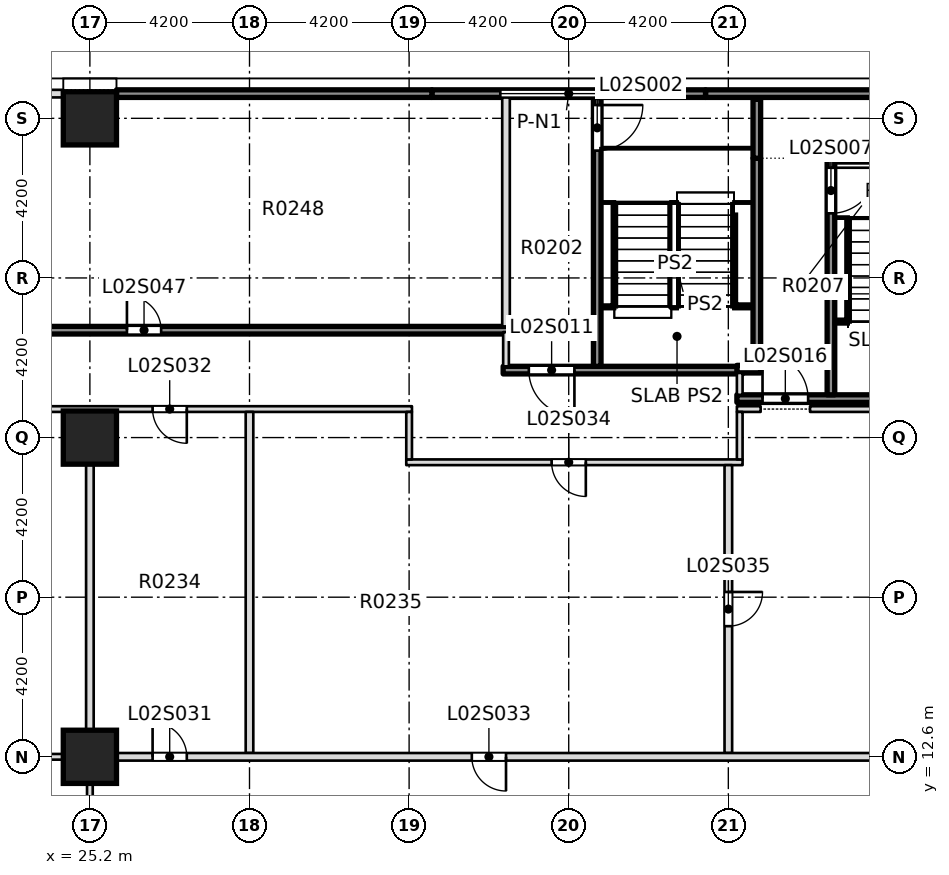
"""IFC4 building model, lengths in metres.
Left out: names, types, materials, properties, quantities, classifications, styles, units other than length and angle.
Written with IfcOpenShell. Run it as: python <this file> out.ifc"""

import sys

from ifc_helpers import new_model, si_unit, direction, frame, frame_2d, origin, origin_2d, place, context, subcontext, project, spatial, rectangle, extrude, element, fill, save


model = new_model("IFC4")
c1 = context("Model", 3, precision=1e-05, world=origin(), true_north=direction((0.0, 1.0)))
c2 = subcontext(c1, "Body", "Model", "MODEL_VIEW")
j1 = project(units=[si_unit("LENGTHUNIT", "METRE"), si_unit("PLANEANGLEUNIT", "RADIAN")], contexts=[c1])
p1 = place(None, origin())
s1 = spatial("IfcSite", under=j1, at=p1, CompositionType="ELEMENT")
p2 = place(p1, origin())
s2 = spatial("IfcBuilding", under=s1, at=p2, CompositionType="ELEMENT")
p3 = place(p2, frame((0.0, 0.0, 12.5)))
s3 = spatial("IfcBuildingStorey", under=s2, at=p3, CompositionType="ELEMENT", Elevation=12.5)
for number, where, z_axis, x_axis in (
    (1, (25.2, 12.6, -0.4), (0.0, 0.0, 1.0), (1.0, 0.0, 0.0)),
    (2, (25.2, 21.0, 0.0), (0.0, 0.0, 1.0), (1.0, 0.0, 0.0)),
    (3, (25.2, 29.4, 0.0), (0.0, 0.0, 1.0), (1.0, 0.0, 0.0)),
):
    element("IfcColumn", number, at=place(p3, frame(where, z_axis=z_axis, x_axis=x_axis)), inside=s3, PredefinedType="COLUMN", context=c2, shape_type="SweptSolid", body=[
        extrude(rectangle(XDim=1.4, YDim=1.4, at=origin_2d()), origin(), (0.0, 0.0, 1.0), 7.5),
    ])
p4 = place(p3, frame((16.725, 12.6, 0.0), z_axis=(0.0, 0.0, 1.0), x_axis=(1.0, 0.0, 0.0)))
e4 = element("IfcWall", 4, at=p4, inside=s3, PredefinedType="PARTITIONING", context=c2, shape_type="SweptSolid", body=[
    extrude(rectangle(XDim=8.575, YDim=0.15, at=frame_2d((4.288, 0.0))), origin(), (0.0, 0.0, 1.0), 7.1),
])
p5 = place(p3, frame((25.1, 12.6, 0.0), z_axis=(0.0, 0.0, 1.0), x_axis=(1.0, 0.0, 0.0)))
e5 = element("IfcWall", 5, at=p5, inside=s3, PredefinedType="PARTITIONING", context=c2, shape_type="SweptSolid", body=[
    extrude(rectangle(XDim=0.8, YDim=0.2, at=frame_2d((0.4, 0.0))), origin(), (0.0, 0.0, 1.0), 7.1),
])
p6 = place(p3, frame((33.525, 20.35, 0.0), z_axis=(0.0, 0.0, 1.0), x_axis=(1.0, 0.0, 0.0)))
e6 = element("IfcWall", 6, at=p6, inside=s3, PredefinedType="PARTITIONING", context=c2, shape_type="SweptSolid", body=[
    extrude(rectangle(XDim=8.85, YDim=0.15, at=frame_2d((4.425, 0.0))), origin(), (0.0, 0.0, 1.0), 7.1),
])
p7 = place(p6, frame((3.825, 0.0, 0.0)))
e7 = element("IfcOpeningElement", 7, at=p7, cuts=e6, PredefinedType="OPENING", context=c2, shape_type="SweptSolid", body=[
    extrude(rectangle(XDim=0.9, YDim=2.1, at=frame_2d((0.45, 1.05))), frame((0.0, 0.085, 0.0), z_axis=(0.0, -1.0, 0.0), x_axis=(1.0, 0.0, 0.0)), (0.0, 0.0, 1.0), 0.17),
])
p8 = place(p3, frame((12.601, 21.75, 0.0), z_axis=(0.0, 0.0, 1.0), x_axis=(1.0, 0.0, 0.0)))
e8 = element("IfcWall", 8, at=p8, inside=s3, PredefinedType="PARTITIONING", context=c2, shape_type="SweptSolid", body=[
    extrude(rectangle(XDim=21.074, YDim=0.15, at=frame_2d((10.537, 0.0))), origin(), (0.0, 0.0, 1.0), 7.1),
])
p9 = place(p8, frame((14.249, 0.0, 0.0)))
e9 = element("IfcOpeningElement", 9, at=p9, cuts=e8, PredefinedType="OPENING", context=c2, shape_type="SweptSolid", body=[
    extrude(rectangle(XDim=0.9, YDim=2.1, at=frame_2d((0.45, 1.05))), frame((0.0, 0.085, 0.0), z_axis=(0.0, -1.0, 0.0), x_axis=(1.0, 0.0, 0.0)), (0.0, 0.0, 1.0), 0.17),
])
p10 = place(p3, frame((42.225, 21.75, 0.0), z_axis=(0.0, 0.0, 1.0), x_axis=(1.0, 0.0, 0.0)))
e10 = element("IfcWall", 10, at=p10, inside=s3, PredefinedType="PARTITIONING", context=c2, shape_type="SweptSolid", body=[
    extrude(rectangle(XDim=0.625, YDim=0.15, at=frame_2d((0.312, 0.0))), origin(), (0.0, 0.0, 1.0), 7.1),
])
p11 = place(p3, frame((42.225, 22.025, 0.0), z_axis=(0.0, 0.0, 1.0), x_axis=(1.0, 0.0, 0.0)))
e11 = element("IfcWall", 11, at=p11, inside=s3, PredefinedType="SOLIDWALL", context=c2, shape_type="SweptSolid", body=[
    extrude(rectangle(XDim=6.75, YDim=0.2, at=frame_2d((3.375, 0.0))), origin(), (0.0, 0.0, 1.0), 7.1),
])
p12 = place(p11, frame((0.675, 0.0, 0.0)))
e12 = element("IfcOpeningElement", 12, at=p12, cuts=e11, PredefinedType="OPENING", context=c2, shape_type="SweptSolid", body=[
    extrude(rectangle(XDim=1.2, YDim=2.1, at=frame_2d((0.6, 1.05))), frame((0.0, 0.11, 0.0), z_axis=(0.0, -1.0, 0.0), x_axis=(1.0, 0.0, 0.0)), (0.0, 0.0, 1.0), 0.22),
])
p13 = place(p3, frame((36.075, 22.775, 0.0), z_axis=(0.0, 0.0, 1.0), x_axis=(1.0, 0.0, 0.0)))
e13 = element("IfcWall", 13, at=p13, inside=s3, PredefinedType="SOLIDWALL", context=c2, shape_type="SweptSolid", body=[
    extrude(rectangle(XDim=6.3, YDim=0.2, at=frame_2d((3.15, 0.0))), origin(), (0.0, 0.0, 1.0), 7.1),
])
p14 = place(p13, frame((0.675, 0.0, 0.0)))
e14 = element("IfcOpeningElement", 14, at=p14, cuts=e13, PredefinedType="OPENING", context=c2, shape_type="SweptSolid", body=[
    extrude(rectangle(XDim=1.2, YDim=2.1, at=frame_2d((0.6, 1.05))), frame((0.0, 0.11, 0.0), z_axis=(0.0, -1.0, 0.0), x_axis=(1.0, 0.0, 0.0)), (0.0, 0.0, 1.0), 0.22),
])
p15 = place(p3, frame((42.225, 22.8, 0.0), z_axis=(0.0, 0.0, 1.0), x_axis=(1.0, 0.0, 0.0)))
e15 = element("IfcWall", 15, at=p15, inside=s3, PredefinedType="SOLIDWALL", context=c2, shape_type="SweptSolid", body=[
    extrude(rectangle(XDim=0.625, YDim=0.2, at=frame_2d((0.312, 0.0))), origin(), (0.0, 0.0, 1.0), 7.1),
])
p16 = place(p3, frame((-15.2, 23.825, 0.0), z_axis=(0.0, 0.0, 1.0), x_axis=(1.0, 0.0, 0.0)))
e16 = element("IfcWall", 16, at=p16, inside=s3, PredefinedType="SOLIDWALL", context=c2, shape_type="SweptSolid", body=[
    extrude(rectangle(XDim=51.45, YDim=0.2, at=frame_2d((25.725, 0.0))), origin(), (0.0, 0.0, 1.0), 7.1),
])
p17 = place(p16, frame((17.9, 0.0, 0.0)))
e17 = element("IfcOpeningElement", 17, at=p17, cuts=e16, PredefinedType="OPENING", context=c2, shape_type="SweptSolid", body=[
    extrude(rectangle(XDim=1.2, YDim=2.1, at=frame_2d((0.6, 1.05))), frame((0.0, 0.11, 0.0), z_axis=(0.0, -1.0, 0.0), x_axis=(1.0, 0.0, 0.0)), (0.0, 0.0, 1.0), 0.22),
])
p18 = place(p16, frame((1.7, 0.0, 0.0)))
e18 = element("IfcOpeningElement", 18, at=p18, cuts=e16, PredefinedType="OPENING", context=c2, shape_type="SweptSolid", body=[
    extrude(rectangle(XDim=0.9, YDim=2.1, at=frame_2d((0.45, 1.05))), frame((0.0, 0.11, 0.0), z_axis=(0.0, -1.0, 0.0), x_axis=(1.0, 0.0, 0.0)), (0.0, 0.0, 1.0), 0.22),
])
p19 = place(p16, frame((8.225, 0.0, 0.0)))
e19 = element("IfcOpeningElement", 19, at=p19, cuts=e16, PredefinedType="OPENING", context=c2, shape_type="SweptSolid", body=[
    extrude(rectangle(XDim=0.9, YDim=2.1, at=frame_2d((0.45, 1.05))), frame((0.0, 0.11, 0.0), z_axis=(0.0, -1.0, 0.0), x_axis=(1.0, 0.0, 0.0)), (0.0, 0.0, 1.0), 0.22),
])
p20 = place(p16, frame((25.4, 0.0, 0.0)))
e20 = element("IfcOpeningElement", 20, at=p20, cuts=e16, PredefinedType="OPENING", context=c2, shape_type="SweptSolid", body=[
    extrude(rectangle(XDim=1.2, YDim=2.1, at=frame_2d((0.6, 1.05))), frame((0.0, 0.11, 0.0), z_axis=(0.0, -1.0, 0.0), x_axis=(1.0, 0.0, 0.0)), (0.0, 0.0, 1.0), 0.22),
])
p21 = place(p16, frame((41.375, 0.0, 0.0)))
e21 = element("IfcOpeningElement", 21, at=p21, cuts=e16, PredefinedType="OPENING", context=c2, shape_type="SweptSolid", body=[
    extrude(rectangle(XDim=0.9, YDim=2.1, at=frame_2d((0.45, 1.05))), frame((0.0, 0.11, 0.0), z_axis=(0.0, -1.0, 0.0), x_axis=(1.0, 0.0, 0.0)), (0.0, 0.0, 1.0), 0.22),
])
p22 = place(p3, frame((25.2, -11.825, 0.0), z_axis=(0.0, 0.0, 1.0), x_axis=(0.0, 1.0, 0.0)))
e22 = element("IfcWall", 22, at=p22, inside=s3, PredefinedType="PARTITIONING", context=c2, shape_type="SweptSolid", body=[
    extrude(rectangle(XDim=24.325, YDim=0.15, at=frame_2d((12.163, 0.0))), origin(), (0.0, 0.0, 1.0), 7.1),
])
p23 = place(p22, frame((10.962, 0.0, 0.0)))
e23 = element("IfcOpeningElement", 23, at=p23, cuts=e22, PredefinedType="OPENING", context=c2, shape_type="SweptSolid", body=[
    extrude(rectangle(XDim=2.4, YDim=2.1, at=frame_2d((1.2, 1.05))), frame((0.0, 0.085, 0.0), z_axis=(0.0, -1.0, 0.0), x_axis=(1.0, 0.0, 0.0)), (0.0, 0.0, 1.0), 0.17),
])
for number, where, z_axis, x_axis in (
    (24, (25.2, 12.7, 0.0), (0.0, 0.0, 1.0), (0.0, 1.0, 0.0)),
    (25, (29.4, 12.7, 0.0), (0.0, 0.0, 1.0), (0.0, 1.0, 0.0)),
):
    element("IfcWall", number, at=place(p3, frame(where, z_axis=z_axis, x_axis=x_axis)), inside=s3, PredefinedType="PARTITIONING", context=c2, shape_type="SweptSolid", body=[
        extrude(rectangle(XDim=8.975, YDim=0.2, at=frame_2d((4.488, 0.0))), origin(), (0.0, 0.0, 1.0), 7.1),
    ])
p24 = place(p3, frame((33.6, 20.425, 0.0), z_axis=(0.0, 0.0, 1.0), x_axis=(0.0, 1.0, 0.0)))
e26 = element("IfcWall", 26, at=p24, inside=s3, PredefinedType="PARTITIONING", context=c2, shape_type="SweptSolid", body=[
    extrude(rectangle(XDim=1.25, YDim=0.15, at=frame_2d((0.625, 0.0))), origin(), (0.0, 0.0, 1.0), 7.1),
])
p25 = place(p3, frame((36.15, 22.875, 0.0), z_axis=(0.0, 0.0, 1.0), x_axis=(0.0, 1.0, 0.0)))
e27 = element("IfcWall", 27, at=p25, inside=s3, PredefinedType="PARTITIONING", context=c2, shape_type="SweptSolid", body=[
    extrude(rectangle(XDim=0.9, YDim=0.15, at=frame_2d((0.45, 0.0))), origin(), (0.0, 0.0, 1.0), 7.1),
])
p26 = place(p3, frame((36.15, 23.925, 0.0), z_axis=(0.0, 0.0, 1.0), x_axis=(0.0, 1.0, 0.0)))
e28 = element("IfcWall", 28, at=p26, inside=s3, PredefinedType="PARTITIONING", context=c2, shape_type="SweptSolid", body=[
    extrude(rectangle(XDim=6.025, YDim=0.2, at=frame_2d((3.012, 0.0))), origin(), (0.0, 0.0, 1.0), 7.1),
])
p27 = place(p3, frame((38.55, 22.875, 0.0), z_axis=(0.0, 0.0, 1.0), x_axis=(0.0, 1.0, 0.0)))
e29 = element("IfcWall", 29, at=p27, inside=s3, PredefinedType="SOLIDWALL", context=c2, shape_type="SweptSolid", body=[
    extrude(rectangle(XDim=7.075, YDim=0.2, at=frame_2d((3.538, 0.0))), origin(), (0.0, 0.0, 1.0), 7.1),
])
p28 = place(p27, frame((5.675, 0.0, 0.0)))
e30 = element("IfcOpeningElement", 30, at=p28, cuts=e29, PredefinedType="OPENING", context=c2, shape_type="SweptSolid", body=[
    extrude(rectangle(XDim=1.2, YDim=2.1, at=frame_2d((0.6, 1.05))), frame((0.0, 0.11, 0.0), z_axis=(0.0, -1.0, 0.0), x_axis=(1.0, 0.0, 0.0)), (0.0, 0.0, 1.0), 0.22),
])
p29 = place(p3, frame((42.0, 12.7, 0.0), z_axis=(0.0, 0.0, 1.0), x_axis=(0.0, 1.0, 0.0)))
e31 = element("IfcWall", 31, at=p29, inside=s3, PredefinedType="PARTITIONING", context=c2, shape_type="SweptSolid", body=[
    extrude(rectangle(XDim=7.575, YDim=0.2, at=frame_2d((3.788, 0.0))), origin(), (0.0, 0.0, 1.0), 7.1),
])
p30 = place(p29, frame((3.337, 0.0, 0.0)))
e32 = element("IfcOpeningElement", 32, at=p30, cuts=e31, PredefinedType="OPENING", context=c2, shape_type="SweptSolid", body=[
    extrude(rectangle(XDim=0.9, YDim=2.1, at=frame_2d((0.45, 1.05))), frame((0.0, 0.11, 0.0), z_axis=(0.0, -1.0, 0.0), x_axis=(1.0, 0.0, 0.0)), (0.0, 0.0, 1.0), 0.22),
])
p31 = place(p3, frame((42.3, 20.425, 0.0), z_axis=(0.0, 0.0, 1.0), x_axis=(0.0, 1.0, 0.0)))
e33 = element("IfcWall", 33, at=p31, inside=s3, PredefinedType="PARTITIONING", context=c2, shape_type="SweptSolid", body=[
    extrude(rectangle(XDim=1.25, YDim=0.15, at=frame_2d((0.625, 0.0))), origin(), (0.0, 0.0, 1.0), 7.1),
])
p32 = place(p3, frame((42.3, 22.125, 0.0), z_axis=(0.0, 0.0, 1.0), x_axis=(0.0, 1.0, 0.0)))
e34 = element("IfcWall", 34, at=p32, inside=s3, PredefinedType="PARTITIONING", context=c2, shape_type="SweptSolid", body=[
    extrude(rectangle(XDim=0.575, YDim=0.15, at=frame_2d((0.288, 0.0))), origin(), (0.0, 0.0, 1.0), 7.1),
])
p33 = place(p3, frame((42.75, 22.9, 0.0), z_axis=(0.0, 0.0, 1.0), x_axis=(0.0, 1.0, 0.0)))
e35 = element("IfcWall", 35, at=p33, inside=s3, PredefinedType="SOLIDWALL", context=c2, shape_type="SweptSolid", body=[
    extrude(rectangle(XDim=5.45, YDim=0.2, at=frame_2d((2.725, 0.0))), origin(), (0.0, 0.0, 1.0), 7.1),
])
p34 = place(p3, frame((44.7, 22.125, 0.0), z_axis=(0.0, 0.0, 1.0), x_axis=(0.0, 1.0, 0.0)))
e36 = element("IfcWall", 36, at=p34, inside=s3, PredefinedType="SOLIDWALL", context=c2, shape_type="SweptSolid", body=[
    extrude(rectangle(XDim=6.225, YDim=0.2, at=frame_2d((3.113, 0.0))), origin(), (0.0, 0.0, 1.0), 7.1),
])
p35 = place(p34, frame((4.775, 0.0, 0.0)))
e37 = element("IfcOpeningElement", 37, at=p35, cuts=e36, PredefinedType="OPENING", context=c2, shape_type="SweptSolid", body=[
    extrude(rectangle(XDim=1.2, YDim=2.1, at=frame_2d((0.6, 1.05))), frame((0.0, 0.11, 0.0), z_axis=(0.0, -1.0, 0.0), x_axis=(1.0, 0.0, 0.0)), (0.0, 0.0, 1.0), 0.22),
])
p36 = place(p3, frame((41.4, 30.05, 0.0), z_axis=(0.0, 0.0, 1.0), x_axis=(1.0, 0.0, 0.0)))
e38 = element("IfcWall", 38, at=p36, inside=s3, PredefinedType="SOLIDWALL", context=c2, shape_type="SweptSolid", body=[
    extrude(rectangle(XDim=8.3, YDim=0.2, at=frame_2d((4.15, 0.0))), origin(), (0.0, 0.0, 1.0), 7.1),
])
p37 = place(p3, frame((24.5, 30.05, 0.0), z_axis=(0.0, 0.0, 1.0), x_axis=(-1.0, 0.0, 0.0)))
e39 = element("IfcWall", 39, at=p37, inside=s3, PredefinedType="STANDARD", context=c2, shape_type="SweptSolid", body=[
    extrude(rectangle(XDim=7.0, YDim=0.2, at=frame_2d((3.5, 0.0))), origin(), (0.0, 0.0, 1.0), 7.1),
])
p38 = place(p37, frame((1.7, 0.0, 0.9)))
e40 = element("IfcOpeningElement", 40, at=p38, cuts=e39, PredefinedType="OPENING", context=c2, shape_type="SweptSolid", body=[
    extrude(rectangle(XDim=3.6, YDim=4.2, at=frame_2d((1.8, 2.1))), frame((0.0, 0.11, 0.0), z_axis=(0.0, -1.0, 0.0), x_axis=(1.0, 0.0, 0.0)), (0.0, 0.0, 1.0), 0.22),
])
p39 = place(p3, frame((42.75, 28.35, 0.0), z_axis=(0.0, 0.0, 1.0), x_axis=(0.0, 1.0, 0.0)))
e41 = element("IfcWall", 41, at=p39, inside=s3, PredefinedType="SOLIDWALL", context=c2, shape_type="SweptSolid", body=[
    extrude(rectangle(XDim=1.55, YDim=0.2, at=frame_2d((0.775, 0.0))), origin(), (0.0, 0.0, 1.0), 7.1),
])
p40 = place(p3, frame((44.85, 28.35, 0.0), z_axis=(0.0, 0.0, 1.0), x_axis=(1.0, 0.0, 0.0)))
e42 = element("IfcWall", 42, at=p40, inside=s3, PredefinedType="SOLIDWALL", context=c2, shape_type="SweptSolid", body=[
    extrude(rectangle(XDim=3.9, YDim=0.2, at=frame_2d((1.95, 0.0))), origin(), (0.0, 0.0, 1.0), 7.1),
])
p41 = place(p3, frame((34.2, 30.05, 0.0), z_axis=(0.0, 0.0, 1.0), x_axis=(1.0, 0.0, 0.0)))
e43 = element("IfcWall", 43, at=p41, inside=s3, PredefinedType="SOLIDWALL", context=c2, shape_type="SweptSolid", body=[
    extrude(rectangle(XDim=7.2, YDim=0.2, at=frame_2d((3.6, 0.0))), origin(), (0.0, 0.0, 1.0), 7.1),
])
p42 = place(p41, frame((1.8, 0.0, 0.9)))
e44 = element("IfcOpeningElement", 44, at=p42, cuts=e43, PredefinedType="OPENING", context=c2, shape_type="SweptSolid", body=[
    extrude(rectangle(XDim=3.6, YDim=4.2, at=frame_2d((1.8, 2.1))), frame((0.0, 0.11, 0.0), z_axis=(0.0, -1.0, 0.0), x_axis=(1.0, 0.0, 0.0)), (0.0, 0.0, 1.0), 0.22),
])
p43 = place(p3, frame((25.9, 30.05, 0.0), z_axis=(0.0, 0.0, 1.0), x_axis=(1.0, 0.0, 0.0)))
e45 = element("IfcWall", 45, at=p43, inside=s3, PredefinedType="SOLIDWALL", context=c2, shape_type="SweptSolid", body=[
    extrude(rectangle(XDim=8.3, YDim=0.2, at=frame_2d((4.15, 0.0))), origin(), (0.0, 0.0, 1.0), 7.1),
])
p44 = place(p3, frame((25.9, 12.6, 0.0), z_axis=(0.0, 0.0, 1.0), x_axis=(1.0, 0.0, 0.0)))
e46 = element("IfcWall", 46, at=p44, inside=s3, PredefinedType="PARTITIONING", context=c2, shape_type="SweptSolid", body=[
    extrude(rectangle(XDim=23.8, YDim=0.2, at=frame_2d((11.9, 0.0))), origin(), (0.0, 0.0, 1.0), 4.4),
])
p45 = place(p44, frame((0.95, 0.0, 0.0)))
e47 = element("IfcOpeningElement", 47, at=p45, cuts=e46, PredefinedType="OPENING", context=c2, shape_type="SweptSolid", body=[
    extrude(rectangle(XDim=0.9, YDim=2.1, at=frame_2d((0.45, 1.05))), frame((0.0, 0.11, 0.0), z_axis=(0.0, -1.0, 0.0), x_axis=(1.0, 0.0, 0.0)), (0.0, 0.0, 1.0), 0.22),
])
p46 = place(p44, frame((9.35, 0.0, 0.0)))
e48 = element("IfcOpeningElement", 48, at=p46, cuts=e46, PredefinedType="OPENING", context=c2, shape_type="SweptSolid", body=[
    extrude(rectangle(XDim=0.9, YDim=2.1, at=frame_2d((0.45, 1.05))), frame((0.0, 0.11, 0.0), z_axis=(0.0, -1.0, 0.0), x_axis=(1.0, 0.0, 0.0)), (0.0, 0.0, 1.0), 0.22),
])
p47 = place(p3, frame((44.15, 21.75, 0.0), z_axis=(0.0, 0.0, 1.0), x_axis=(1.0, 0.0, 0.0)))
e49 = element("IfcWall", 49, at=p47, inside=s3, PredefinedType="PARTITIONING", context=c2, shape_type="SweptSolid", body=[
    extrude(rectangle(XDim=6.8, YDim=0.15, at=frame_2d((3.4, 0.0))), origin(), (0.0, 0.0, 1.0), 7.1),
])
p48 = place(p28, origin())
e50 = element("IfcDoor", 50, at=p48, inside=s3, OperationType="DOUBLE_DOOR_SINGLE_SWING", PredefinedType="DOOR", context=c2, shape_type="SweptSolid", body=[
    extrude(rectangle(XDim=1.2, YDim=2.1, at=frame_2d((0.6, 1.05))), frame((0.0, 0.025, 0.0), z_axis=(0.0, -1.0, 0.0), x_axis=(1.0, 0.0, 0.0)), (0.0, 0.0, 1.0), 0.05),
])
fill(e30, e50)
p49 = place(p35, origin())
e51 = element("IfcDoor", 51, at=p49, inside=s3, OperationType="DOUBLE_DOOR_SINGLE_SWING", PredefinedType="DOOR", context=c2, shape_type="SweptSolid", body=[
    extrude(rectangle(XDim=1.2, YDim=2.1, at=frame_2d((0.6, 1.05))), frame((0.0, 0.025, 0.0), z_axis=(0.0, -1.0, 0.0), x_axis=(1.0, 0.0, 0.0)), (0.0, 0.0, 1.0), 0.05),
])
fill(e37, e51)
p50 = place(p14, origin())
e52 = element("IfcDoor", 52, at=p50, inside=s3, OperationType="SINGLE_SWING_LEFT", PredefinedType="DOOR", context=c2, shape_type="SweptSolid", body=[
    extrude(rectangle(XDim=1.2, YDim=2.1, at=frame_2d((0.6, 1.05))), frame((0.0, 0.025, 0.0), z_axis=(0.0, -1.0, 0.0), x_axis=(1.0, 0.0, 0.0)), (0.0, 0.0, 1.0), 0.05),
])
fill(e14, e52)
p51 = place(p12, origin())
e53 = element("IfcDoor", 53, at=p51, inside=s3, OperationType="SINGLE_SWING_LEFT", PredefinedType="DOOR", context=c2, shape_type="SweptSolid", body=[
    extrude(rectangle(XDim=1.2, YDim=2.1, at=frame_2d((0.6, 1.05))), frame((0.0, 0.025, 0.0), z_axis=(0.0, -1.0, 0.0), x_axis=(1.0, 0.0, 0.0)), (0.0, 0.0, 1.0), 0.05),
])
fill(e12, e53)
p52 = place(p45, origin())
e54 = element("IfcDoor", 54, at=p52, inside=s3, OperationType="SINGLE_SWING_RIGHT", PredefinedType="DOOR", context=c2, shape_type="SweptSolid", body=[
    extrude(rectangle(XDim=0.9, YDim=2.1, at=frame_2d((0.45, 1.05))), frame((0.0, 0.025, 0.0), z_axis=(0.0, -1.0, 0.0), x_axis=(1.0, 0.0, 0.0)), (0.0, 0.0, 1.0), 0.05),
])
fill(e47, e54)
p53 = place(p9, origin())
e55 = element("IfcDoor", 55, at=p53, inside=s3, OperationType="SINGLE_SWING_LEFT", PredefinedType="DOOR", context=c2, shape_type="SweptSolid", body=[
    extrude(rectangle(XDim=0.9, YDim=2.1, at=frame_2d((0.45, 1.05))), frame((0.0, 0.025, 0.0), z_axis=(0.0, -1.0, 0.0), x_axis=(1.0, 0.0, 0.0)), (0.0, 0.0, 1.0), 0.05),
])
fill(e9, e55)
p54 = place(p46, origin())
e56 = element("IfcDoor", 56, at=p54, inside=s3, OperationType="SINGLE_SWING_LEFT", PredefinedType="DOOR", context=c2, shape_type="SweptSolid", body=[
    extrude(rectangle(XDim=0.9, YDim=2.1, at=frame_2d((0.45, 1.05))), frame((0.0, 0.025, 0.0), z_axis=(0.0, -1.0, 0.0), x_axis=(1.0, 0.0, 0.0)), (0.0, 0.0, 1.0), 0.05),
])
fill(e48, e56)
p55 = place(p7, origin())
e57 = element("IfcDoor", 57, at=p55, inside=s3, OperationType="SINGLE_SWING_RIGHT", PredefinedType="DOOR", context=c2, shape_type="SweptSolid", body=[
    extrude(rectangle(XDim=0.9, YDim=2.1, at=frame_2d((0.45, 1.05))), frame((0.0, 0.025, 0.0), z_axis=(0.0, -1.0, 0.0), x_axis=(1.0, 0.0, 0.0)), (0.0, 0.0, 1.0), 0.05),
])
fill(e7, e57)
p56 = place(p30, origin())
e58 = element("IfcDoor", 58, at=p56, inside=s3, OperationType="SINGLE_SWING_RIGHT", PredefinedType="DOOR", context=c2, shape_type="SweptSolid", body=[
    extrude(rectangle(XDim=0.9, YDim=2.1, at=frame_2d((0.45, 1.05))), frame((0.0, 0.025, 0.0), z_axis=(0.0, -1.0, 0.0), x_axis=(1.0, 0.0, 0.0)), (0.0, 0.0, 1.0), 0.05),
])
fill(e32, e58)
p57 = place(p21, origin())
e59 = element("IfcDoor", 59, at=p57, inside=s3, OperationType="SINGLE_SWING_RIGHT", PredefinedType="DOOR", context=c2, shape_type="SweptSolid", body=[
    extrude(rectangle(XDim=0.9, YDim=2.1, at=frame_2d((0.45, 1.05))), frame((0.0, 0.025, 0.0), z_axis=(0.0, -1.0, 0.0), x_axis=(1.0, 0.0, 0.0)), (0.0, 0.0, 1.0), 0.05),
])
fill(e21, e59)
p58 = place(p42, origin())
e60 = element("IfcWindow", 60, at=p58, inside=s3, PartitioningType="SINGLE_PANEL", PredefinedType="WINDOW", context=c2, shape_type="SweptSolid", body=[
    extrude(rectangle(XDim=3.6, YDim=4.2, at=frame_2d((1.8, 2.1))), frame((0.0, 0.03, 0.0), z_axis=(0.0, -1.0, 0.0), x_axis=(1.0, 0.0, 0.0)), (0.0, 0.0, 1.0), 0.06),
])
fill(e44, e60)
save(model, sys.argv[1])
